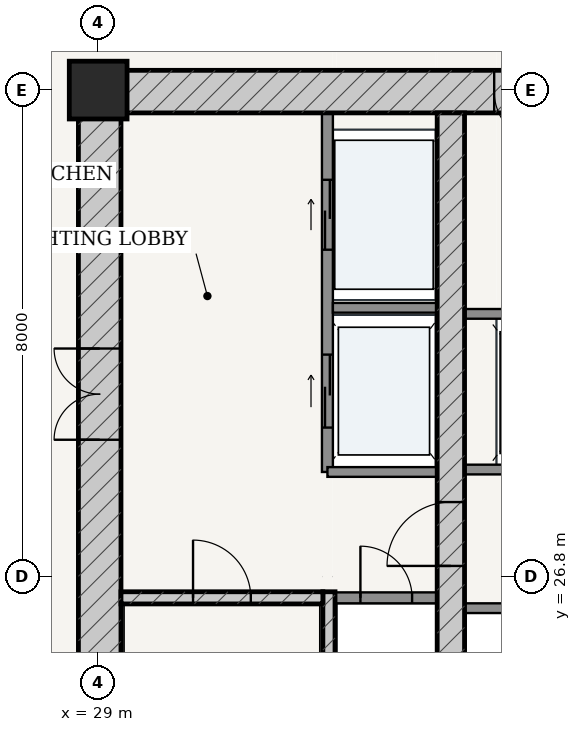
"""IFC4 building model, lengths in metres.
Left out: names, types, materials, properties, quantities, classifications, styles, units other than length and angle.
Written with IfcOpenShell. Run it as: python <this file> out.ifc"""

import sys

from ifc_helpers import new_model, si_unit, direction, frame, frame_2d, origin, origin_2d, place, context, subcontext, project, spatial, rectangle, extrude, source, transform, mapped, element, fill, save


model = new_model("IFC4")
c1 = context("Model", 3, precision=1e-05, world=origin(), true_north=direction((-0.2419218956, 0.970295726276)))
c2 = subcontext(c1, "Body", "Model", "MODEL_VIEW")
j1 = project(units=[si_unit("LENGTHUNIT", "METRE"), si_unit("PLANEANGLEUNIT", "RADIAN")], contexts=[c1])
p1 = place(None, origin())
s1 = spatial("IfcSite", under=j1, at=p1, CompositionType="ELEMENT")
p2 = place(p1, origin())
s2 = spatial("IfcBuilding", under=s1, at=p2, CompositionType="ELEMENT")
p3 = place(p2, frame((0.0, 0.0, 83.4)))
s3 = spatial("IfcBuildingStorey", under=s2, at=p3, CompositionType="ELEMENT", Elevation=83.4)
p4 = place(p3, frame((29.0, 34.8, 0.0), z_axis=(0.0, 0.0, 1.0), x_axis=(1.0, 0.0, 0.0)))
e1 = element("IfcColumn", 1, at=p4, inside=s3, PredefinedType="COLUMN", context=c2, shape_type="SweptSolid", body=[
    extrude(rectangle(XDim=0.95, YDim=0.95, at=origin_2d()), origin(), (0.0, 0.0, 1.0), 3.6),
])
p5 = place(p3, frame((28.675, 34.775, 0.0), z_axis=(0.0, 0.0, 1.0), x_axis=(1.0, 0.0, 0.0)))
e2 = element("IfcWall", 2, at=p5, inside=s3, PredefinedType="SHEAR", context=c2, shape_type="SweptSolid", body=[
    extrude(rectangle(XDim=18.65, YDim=0.7, at=frame_2d((9.325, 0.0))), origin(), (0.0, 0.0, 1.0), 3.325),
])
p6 = place(p5, frame((6.837, 0.0, 0.0)))
e3 = element("IfcOpeningElement", 3, at=p6, cuts=e2, PredefinedType="OPENING", context=c2, shape_type="SweptSolid", body=[
    extrude(rectangle(XDim=0.85, YDim=2.1, at=frame_2d((0.425, 1.05))), frame((0.0, 0.36, 0.0), z_axis=(0.0, -1.0, 0.0), x_axis=(1.0, 0.0, 0.0)), (0.0, 0.0, 1.0), 0.72),
])
p7 = place(p5, frame((8.895, 0.0, 0.0)))
e4 = element("IfcOpeningElement", 4, at=p7, cuts=e2, PredefinedType="OPENING", context=c2, shape_type="SweptSolid", body=[
    extrude(rectangle(XDim=0.86, YDim=2.1, at=frame_2d((0.43, 1.05))), frame((0.0, 0.36, 0.0), z_axis=(0.0, -1.0, 0.0), x_axis=(1.0, 0.0, 0.0)), (0.0, 0.0, 1.0), 0.72),
])
p8 = place(p5, frame((10.962, 0.0, 0.0)))
e5 = element("IfcOpeningElement", 5, at=p8, cuts=e2, PredefinedType="OPENING", context=c2, shape_type="SweptSolid", body=[
    extrude(rectangle(XDim=0.85, YDim=2.1, at=frame_2d((0.425, 1.05))), frame((0.0, 0.36, 0.0), z_axis=(0.0, -1.0, 0.0), x_axis=(1.0, 0.0, 0.0)), (0.0, 0.0, 1.0), 0.72),
])
p9 = place(p3, frame((29.025, 19.175, 0.0), z_axis=(0.0, 0.0, 1.0), x_axis=(0.0, 1.0, 0.0)))
e6 = element("IfcWall", 6, at=p9, inside=s3, PredefinedType="SHEAR", context=c2, shape_type="SweptSolid", body=[
    extrude(rectangle(XDim=15.25, YDim=0.7, at=frame_2d((7.625, 0.0))), origin(), (0.0, 0.0, 1.0), 3.325),
])
p10 = place(p9, frame((9.875, 0.0, 0.0)))
e7 = element("IfcOpeningElement", 7, at=p10, cuts=e6, PredefinedType="OPENING", context=c2, shape_type="SweptSolid", body=[
    extrude(rectangle(XDim=1.5, YDim=2.2, at=frame_2d((0.75, 1.1))), frame((0.0, 0.36, 0.0), z_axis=(0.0, -1.0, 0.0), x_axis=(1.0, 0.0, 0.0)), (0.0, 0.0, 1.0), 0.72),
])
p11 = place(p3, frame((32.795, 19.175, 0.0), z_axis=(0.0, 0.0, 1.0), x_axis=(0.0, 1.0, 0.0)))
e8 = element("IfcWall", 8, at=p11, inside=s3, PredefinedType="SOLIDWALL", context=c2, shape_type="SweptSolid", body=[
    extrude(rectangle(XDim=7.375, YDim=0.2, at=frame_2d((3.688, 0.0))), origin(), (0.0, 0.0, 1.0), 3.325),
])
p12 = place(p3, frame((29.375, 26.45, 0.0), z_axis=(0.0, 0.0, 1.0), x_axis=(1.0, 0.0, 0.0)))
e9 = element("IfcWall", 9, at=p12, inside=s3, PredefinedType="SOLIDWALL", context=c2, shape_type="SweptSolid", body=[
    extrude(rectangle(XDim=3.32, YDim=0.2, at=frame_2d((1.66, 0.0))), origin(), (0.0, 0.0, 1.0), 3.325),
])
p13 = place(p12, frame((1.185, 0.0, 0.0)))
e10 = element("IfcOpeningElement", 10, at=p13, cuts=e9, PredefinedType="OPENING", context=c2, shape_type="SweptSolid", body=[
    extrude(rectangle(XDim=0.95, YDim=2.15, at=frame_2d((0.475, 1.075))), frame((0.0, 0.11, 0.0), z_axis=(0.0, -1.0, 0.0), x_axis=(1.0, 0.0, 0.0)), (0.0, 0.0, 1.0), 0.22),
])
p14 = place(p3, frame((34.8, 19.175, 0.0), z_axis=(0.0, 0.0, 1.0), x_axis=(0.0, 1.0, 0.0)))
e11 = element("IfcWall", 11, at=p14, inside=s3, PredefinedType="SHEAR", context=c2, shape_type="SweptSolid", body=[
    extrude(rectangle(XDim=15.25, YDim=0.45, at=frame_2d((7.625, 0.0))), origin(), (0.0, 0.0, 1.0), 3.325),
])
p15 = place(p14, frame((7.8, 0.0, 0.0)))
e12 = element("IfcOpeningElement", 12, at=p15, cuts=e11, PredefinedType="OPENING", context=c2, shape_type="SweptSolid", body=[
    extrude(rectangle(XDim=1.05, YDim=2.15, at=frame_2d((0.525, 1.075))), frame((0.0, 0.235, 0.0), z_axis=(0.0, -1.0, 0.0), x_axis=(1.0, 0.0, 0.0)), (0.0, 0.0, 1.0), 0.47),
])
p16 = place(p3, frame((32.9, 26.45, 0.0), z_axis=(0.0, 0.0, 1.0), x_axis=(1.0, 0.0, 0.0)))
e13 = element("IfcWall", 13, at=p16, inside=s3, PredefinedType="PARTITIONING", context=c2, shape_type="SweptSolid", body=[
    extrude(rectangle(XDim=1.675, YDim=0.18, at=frame_2d((0.837, 0.0))), origin(), (0.0, 0.0, 1.0), 3.325),
])
p17 = place(p16, frame((0.413, 0.0, 0.0)))
e14 = element("IfcOpeningElement", 14, at=p17, cuts=e13, PredefinedType="OPENING", context=c2, shape_type="SweptSolid", body=[
    extrude(rectangle(XDim=0.85, YDim=2.1, at=frame_2d((0.425, 1.05))), frame((0.0, 0.1, 0.0), z_axis=(0.0, -1.0, 0.0), x_axis=(1.0, 0.0, 0.0)), (0.0, 0.0, 1.0), 0.2),
])
p18 = place(p3, frame((32.77, 28.52, 0.0), z_axis=(0.0, 0.0, 1.0), x_axis=(0.0, 1.0, 0.0)))
e15 = element("IfcWall", 15, at=p18, inside=s3, PredefinedType="PARTITIONING", context=c2, shape_type="SweptSolid", body=[
    extrude(rectangle(XDim=5.905, YDim=0.18, at=frame_2d((2.953, 0.0))), origin(), (0.0, 0.0, 1.0), 3.325),
])
p19 = place(p18, frame((3.655, 0.0, 0.0)))
e16 = element("IfcOpeningElement", 16, at=p19, cuts=e15, PredefinedType="OPENING", context=c2, shape_type="SweptSolid", body=[
    extrude(rectangle(XDim=1.15, YDim=2.2, at=frame_2d((0.575, 1.1))), frame((0.0, 0.1, 0.0), z_axis=(0.0, -1.0, 0.0), x_axis=(1.0, 0.0, 0.0)), (0.0, 0.0, 1.0), 0.2),
])
p20 = place(p18, frame((0.73, 0.0, 0.0)))
e17 = element("IfcOpeningElement", 17, at=p20, cuts=e15, PredefinedType="OPENING", context=c2, shape_type="SweptSolid", body=[
    extrude(rectangle(XDim=1.2, YDim=2.25, at=frame_2d((0.6, 1.125))), frame((0.0, 0.1, 0.0), z_axis=(0.0, -1.0, 0.0), x_axis=(1.0, 0.0, 0.0)), (0.0, 0.0, 1.0), 0.2),
])
p21 = place(p3, frame((32.86, 31.22, 0.0), z_axis=(0.0, 0.0, 1.0), x_axis=(1.0, 0.0, 0.0)))
e18 = element("IfcWall", 18, at=p21, inside=s3, PredefinedType="PARTITIONING", context=c2, shape_type="SweptSolid", body=[
    extrude(rectangle(XDim=1.715, YDim=0.16, at=frame_2d((0.857, 0.0))), origin(), (0.0, 0.0, 1.0), 3.325),
])
p22 = place(p3, frame((32.77, 28.52, 0.0), z_axis=(0.0, 0.0, 1.0), x_axis=(1.0, 0.0, 0.0)))
e19 = element("IfcWall", 19, at=p22, inside=s3, PredefinedType="PARTITIONING", context=c2, shape_type="SweptSolid", body=[
    extrude(rectangle(XDim=1.805, YDim=0.16, at=frame_2d((0.902, 0.0))), origin(), (0.0, 0.0, 1.0), 3.325),
])
p23 = place(p3, frame((35.025, 28.56, 0.0), z_axis=(0.0, 0.0, 1.0), x_axis=(1.0, 0.0, 0.0)))
e20 = element("IfcWall", 20, at=p23, inside=s3, PredefinedType="PARTITIONING", context=c2, shape_type="SweptSolid", body=[
    extrude(rectangle(XDim=5.95, YDim=0.16, at=frame_2d((2.975, 0.0))), origin(), (0.0, 0.0, 1.0), 3.325),
])
p24 = place(p23, frame((0.76, 0.0, 0.0)))
e21 = element("IfcOpeningElement", 21, at=p24, cuts=e20, PredefinedType="OPENING", context=c2, shape_type="SweptSolid", body=[
    extrude(rectangle(XDim=1.1, YDim=2.2, at=frame_2d((0.55, 1.1))), frame((0.0, 0.09, 0.0), z_axis=(0.0, -1.0, 0.0), x_axis=(1.0, 0.0, 0.0)), (0.0, 0.0, 1.0), 0.18),
])
p25 = place(p23, frame((2.425, 0.0, 0.0)))
e22 = element("IfcOpeningElement", 22, at=p25, cuts=e20, PredefinedType="OPENING", context=c2, shape_type="SweptSolid", body=[
    extrude(rectangle(XDim=1.1, YDim=2.2, at=frame_2d((0.55, 1.1))), frame((0.0, 0.09, 0.0), z_axis=(0.0, -1.0, 0.0), x_axis=(1.0, 0.0, 0.0)), (0.0, 0.0, 1.0), 0.18),
])
p26 = place(p23, frame((4.09, 0.0, 0.0)))
e23 = element("IfcOpeningElement", 23, at=p26, cuts=e20, PredefinedType="OPENING", context=c2, shape_type="SweptSolid", body=[
    extrude(rectangle(XDim=1.1, YDim=2.2, at=frame_2d((0.55, 1.1))), frame((0.0, 0.09, 0.0), z_axis=(0.0, -1.0, 0.0), x_axis=(1.0, 0.0, 0.0)), (0.0, 0.0, 1.0), 0.18),
])
for number, where, z_axis, x_axis in (
    (24, (35.025, 31.12, 0.0), (0.0, 0.0, 1.0), (1.0, 0.0, 0.0)),
    (25, (35.025, 26.28, 0.0), (0.0, 0.0, 1.0), (1.0, 0.0, 0.0)),
):
    element("IfcWall", number, at=place(p3, frame(where, z_axis=z_axis, x_axis=x_axis)), inside=s3, PredefinedType="PARTITIONING", context=c2, shape_type="SweptSolid", body=[
        extrude(rectangle(XDim=5.95, YDim=0.16, at=frame_2d((2.975, 0.0))), origin(), (0.0, 0.0, 1.0), 3.325),
    ])
m1 = source(origin(), c2, "Body", "SweptSolid", [
    extrude(rectangle(XDim=1.5, YDim=2.2, at=frame_2d((0.75, 1.1))), frame((0.0, 0.025, 0.0), z_axis=(0.0, -1.0, 0.0), x_axis=(1.0, 0.0, 0.0)), (0.0, 0.0, 1.0), 0.05),
])
p27 = place(p10, origin())
e26 = element("IfcDoor", 26, at=p27, inside=s3, OperationType="DOUBLE_DOOR_SINGLE_SWING", PredefinedType="DOOR", context=c2, shape_type="MappedRepresentation", body=[
    mapped(m1, transform((0.0, 0.0, 0.0), scale=1.0)),
])
fill(e7, e26)
m2 = source(origin(), c2, "Body", "SweptSolid", [
    extrude(rectangle(XDim=1.05, YDim=2.15, at=frame_2d((0.525, 1.075))), frame((0.0, 0.025, 0.0), z_axis=(0.0, -1.0, 0.0), x_axis=(1.0, 0.0, 0.0)), (0.0, 0.0, 1.0), 0.05),
])
p28 = place(p15, origin())
e27 = element("IfcDoor", 27, at=p28, inside=s3, OperationType="SINGLE_SWING_LEFT", PredefinedType="DOOR", context=c2, shape_type="MappedRepresentation", body=[
    mapped(m2, transform((0.0, 0.0, 0.0), scale=1.0)),
])
fill(e12, e27)
m3 = source(origin(), c2, "Body", "SweptSolid", [
    extrude(rectangle(XDim=0.95, YDim=2.15, at=frame_2d((0.475, 1.075))), frame((0.0, 0.025, 0.0), z_axis=(0.0, -1.0, 0.0), x_axis=(1.0, 0.0, 0.0)), (0.0, 0.0, 1.0), 0.05),
])
p29 = place(p13, origin())
e28 = element("IfcDoor", 28, at=p29, inside=s3, OperationType="SINGLE_SWING_LEFT", PredefinedType="DOOR", context=c2, shape_type="MappedRepresentation", body=[
    mapped(m3, transform((0.0, 0.0, 0.0), scale=1.0)),
])
fill(e10, e28)
m4 = source(origin(), c2, "Body", "SweptSolid", [
    extrude(rectangle(XDim=0.85, YDim=2.1, at=frame_2d((0.425, 1.05))), frame((0.0, 0.025, 0.0), z_axis=(0.0, -1.0, 0.0), x_axis=(1.0, 0.0, 0.0)), (0.0, 0.0, 1.0), 0.05),
])
p30 = place(p17, origin())
e29 = element("IfcDoor", 29, at=p30, inside=s3, OperationType="SINGLE_SWING_LEFT", PredefinedType="DOOR", context=c2, shape_type="MappedRepresentation", body=[
    mapped(m4, transform((0.0, 0.0, 0.0), scale=1.0)),
])
fill(e14, e29)
p31 = place(p6, frame((0.85, 0.0, 0.0), z_axis=(0.0, 0.0, 1.0), x_axis=(-1.0, 0.0, 0.0)))
e30 = element("IfcDoor", 30, at=p31, inside=s3, OperationType="SINGLE_SWING_LEFT", PredefinedType="DOOR", context=c2, shape_type="MappedRepresentation", body=[
    mapped(m4, transform((0.0, 0.0, 0.0), scale=1.0)),
])
fill(e3, e30)
m5 = source(origin(), c2, "Body", "SweptSolid", [
    extrude(rectangle(XDim=1.15, YDim=2.2, at=frame_2d((0.575, 1.1))), frame((0.0, 0.025, 0.0), z_axis=(0.0, -1.0, 0.0), x_axis=(1.0, 0.0, 0.0)), (0.0, 0.0, 1.0), 0.05),
])
p32 = place(p19, origin())
e31 = element("IfcDoor", 31, at=p32, inside=s3, OperationType="DOUBLE_DOOR_SLIDING", PredefinedType="DOOR", context=c2, shape_type="MappedRepresentation", body=[
    mapped(m5, transform((0.0, 0.0, 0.0), scale=1.0)),
])
fill(e16, e31)
m6 = source(origin(), c2, "Body", "SweptSolid", [
    extrude(rectangle(XDim=1.2, YDim=2.25, at=frame_2d((0.6, 1.125))), frame((0.0, 0.025, 0.0), z_axis=(0.0, -1.0, 0.0), x_axis=(1.0, 0.0, 0.0)), (0.0, 0.0, 1.0), 0.05),
])
p33 = place(p20, origin())
e32 = element("IfcDoor", 32, at=p33, inside=s3, OperationType="DOUBLE_DOOR_SLIDING", PredefinedType="DOOR", context=c2, shape_type="MappedRepresentation", body=[
    mapped(m6, transform((0.0, 0.0, 0.0), scale=1.0)),
])
fill(e17, e32)
save(model, sys.argv[1])
